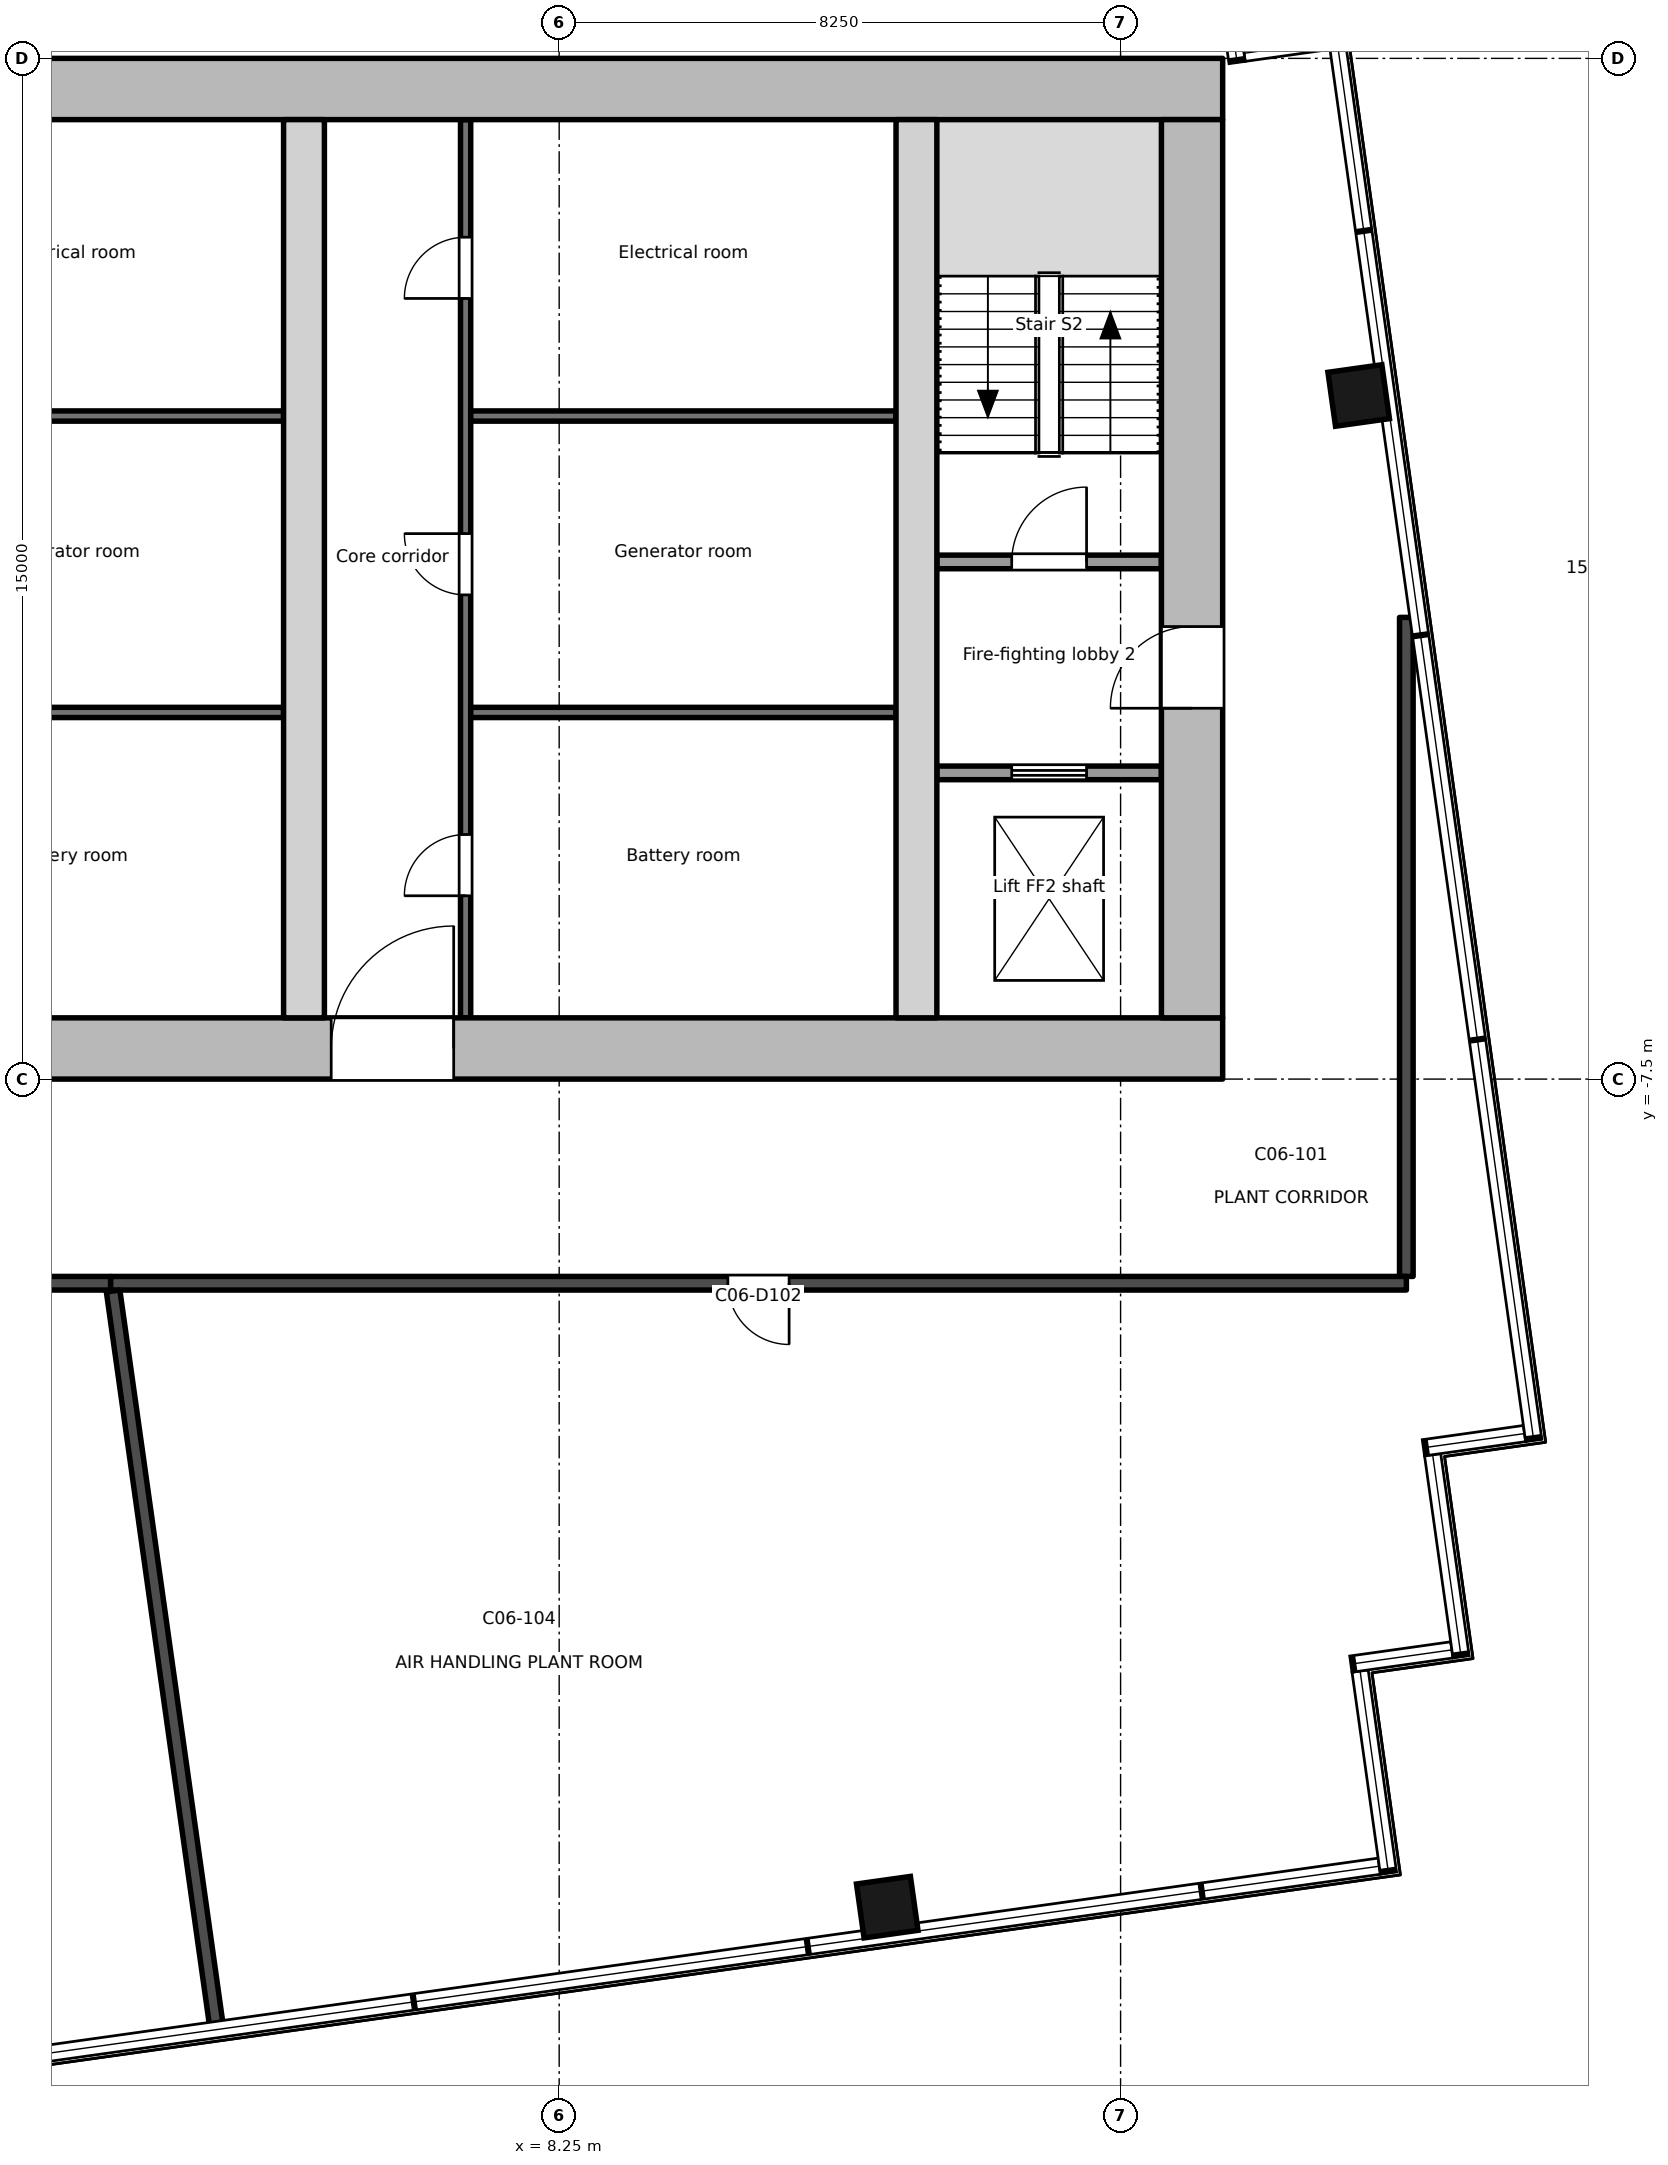
"""IFC4 building model, lengths in metres.
Left out: names, types, materials, properties, quantities, classifications, styles, units other than length and angle.
Written with IfcOpenShell. Run it as: python <this file> out.ifc"""

import sys

from ifc_helpers import new_model, si_unit, direction, frame, frame_2d, origin, origin_2d, place, context, subcontext, project, spatial, rectangle, extrude, element, fill, save


model = new_model("IFC4")
c1 = context("Model", 3, precision=1e-05, world=origin(), true_north=direction((0.0, 1.0)))
c2 = subcontext(c1, "Body", "Model", "MODEL_VIEW")
j1 = project(units=[si_unit("LENGTHUNIT", "METRE"), si_unit("PLANEANGLEUNIT", "RADIAN")], contexts=[c1])
p1 = place(None, origin())
s1 = spatial("IfcSite", under=j1, at=p1, CompositionType="ELEMENT")
p2 = place(p1, origin())
s2 = spatial("IfcBuilding", under=s1, at=p2, CompositionType="ELEMENT")
p3 = place(p2, frame((0.0, 0.0, 312.3)))
s3 = spatial("IfcBuildingStorey", under=s2, at=p3, CompositionType="ELEMENT", Elevation=312.3)
for number, where, z_axis, x_axis in (
    (1, (13.071, -19.669, -0.2), (0.0, 0.0, 1.0), (0.99, 0.139, 0.0)),
    (2, (19.999, 2.546, -0.2), (0.0, 0.0, 1.0), (-0.139, 0.99, 0.0)),
):
    element("IfcColumn", number, at=place(p3, frame(where, z_axis=z_axis, x_axis=x_axis)), inside=s3, PredefinedType="COLUMN", context=c2, shape_type="SweptSolid", body=[
        extrude(rectangle(XDim=0.8, YDim=0.8, at=origin_2d()), origin(), (0.0, 0.0, 1.0), 3.95),
    ])
p4 = place(p3, frame((-18.0, -7.05, -0.2), z_axis=(0.0, 0.0, 1.0), x_axis=(1.0, 0.0, 0.0)))
e3 = element("IfcWall", 3, at=p4, inside=s3, PredefinedType="SHEAR", context=c2, shape_type="SweptSolid", body=[
    extrude(rectangle(XDim=36.0, YDim=0.9, at=frame_2d((18.0, 0.0))), origin(), (0.0, 0.0, 1.0), 3.95),
])
p5 = place(p4, frame((4.9, 0.0, 0.2)))
e4 = element("IfcOpeningElement", 4, at=p5, cuts=e3, PredefinedType="OPENING", context=c2, shape_type="SweptSolid", body=[
    extrude(rectangle(XDim=1.8, YDim=2.1, at=frame_2d((0.9, 1.05))), frame((0.0, 0.46, 0.0), z_axis=(0.0, -1.0, 0.0), x_axis=(1.0, 0.0, 0.0)), (0.0, 0.0, 1.0), 0.921),
])
p6 = place(p4, frame((13.9, 0.0, 0.2)))
e5 = element("IfcOpeningElement", 5, at=p6, cuts=e3, PredefinedType="OPENING", context=c2, shape_type="SweptSolid", body=[
    extrude(rectangle(XDim=1.8, YDim=2.1, at=frame_2d((0.9, 1.05))), frame((0.0, 0.46, 0.0), z_axis=(0.0, -1.0, 0.0), x_axis=(1.0, 0.0, 0.0)), (0.0, 0.0, 1.0), 0.921),
])
p7 = place(p4, frame((22.9, 0.0, 0.2)))
e6 = element("IfcOpeningElement", 6, at=p7, cuts=e3, PredefinedType="OPENING", context=c2, shape_type="SweptSolid", body=[
    extrude(rectangle(XDim=1.8, YDim=2.1, at=frame_2d((0.9, 1.05))), frame((0.0, 0.46, 0.0), z_axis=(0.0, -1.0, 0.0), x_axis=(1.0, 0.0, 0.0)), (0.0, 0.0, 1.0), 0.921),
])
p8 = place(p3, frame((-18.0, 7.05, -0.2), z_axis=(0.0, 0.0, 1.0), x_axis=(1.0, 0.0, 0.0)))
e7 = element("IfcWall", 7, at=p8, inside=s3, PredefinedType="SHEAR", context=c2, shape_type="SweptSolid", body=[
    extrude(rectangle(XDim=36.0, YDim=0.9, at=frame_2d((18.0, 0.0))), origin(), (0.0, 0.0, 1.0), 3.95),
])
p9 = place(p3, frame((17.55, -6.6, -0.2), z_axis=(0.0, 0.0, 1.0), x_axis=(0.0, 1.0, 0.0)))
e8 = element("IfcWall", 8, at=p9, inside=s3, PredefinedType="SHEAR", context=c2, shape_type="SweptSolid", body=[
    extrude(rectangle(XDim=13.2, YDim=0.9, at=frame_2d((6.6, 0.0))), origin(), (0.0, 0.0, 1.0), 3.95),
])
p10 = place(p9, frame((4.55, 0.0, 0.2)))
e9 = element("IfcOpeningElement", 9, at=p10, cuts=e8, PredefinedType="OPENING", context=c2, shape_type="SweptSolid", body=[
    extrude(rectangle(XDim=1.2, YDim=2.1, at=frame_2d((0.6, 1.05))), frame((0.0, 0.46, 0.0), z_axis=(0.0, -1.0, 0.0), x_axis=(1.0, 0.0, 0.0)), (0.0, 0.0, 1.0), 0.921),
])
for number, where, z_axis, x_axis in (
    (10, (4.5, -6.6, -0.2), (0.0, 0.0, 1.0), (0.0, 1.0, 0.0)),
    (11, (13.5, -6.6, -0.2), (0.0, 0.0, 1.0), (0.0, 1.0, 0.0)),
):
    element("IfcWall", number, at=place(p3, frame(where, z_axis=z_axis, x_axis=x_axis)), inside=s3, PredefinedType="SHEAR", context=c2, shape_type="SweptSolid", body=[
        extrude(rectangle(XDim=13.2, YDim=0.6, at=frame_2d((6.6, 0.0))), origin(), (0.0, 0.0, 1.0), 3.95),
    ])
p11 = place(p3, frame((13.8, -3.0, 0.0), z_axis=(0.0, 0.0, 1.0), x_axis=(1.0, 0.0, 0.0)))
e12 = element("IfcWall", 12, at=p11, inside=s3, PredefinedType="PARTITIONING", context=c2, shape_type="SweptSolid", body=[
    extrude(rectangle(XDim=3.3, YDim=0.2, at=frame_2d((1.65, 0.0))), origin(), (0.0, 0.0, 1.0), 3.75),
])
p12 = place(p11, frame((1.1, 0.0, 0.0)))
e13 = element("IfcOpeningElement", 13, at=p12, cuts=e12, PredefinedType="OPENING", context=c2, shape_type="SweptSolid", body=[
    extrude(rectangle(XDim=1.1, YDim=2.1, at=frame_2d((0.55, 1.05))), frame((0.0, 0.111, 0.0), z_axis=(0.0, -1.0, 0.0), x_axis=(1.0, 0.0, 0.0)), (0.0, 0.0, 1.0), 0.221),
])
p13 = place(p3, frame((13.8, 0.1, 0.0), z_axis=(0.0, 0.0, 1.0), x_axis=(1.0, 0.0, 0.0)))
e14 = element("IfcWall", 14, at=p13, inside=s3, PredefinedType="PARTITIONING", context=c2, shape_type="SweptSolid", body=[
    extrude(rectangle(XDim=3.3, YDim=0.2, at=frame_2d((1.65, 0.0))), origin(), (0.0, 0.0, 1.0), 3.75),
])
p14 = place(p13, frame((1.1, 0.0, 0.0)))
e15 = element("IfcOpeningElement", 15, at=p14, cuts=e14, PredefinedType="OPENING", context=c2, shape_type="SweptSolid", body=[
    extrude(rectangle(XDim=1.1, YDim=2.1, at=frame_2d((0.55, 1.05))), frame((0.0, 0.111, 0.0), z_axis=(0.0, -1.0, 0.0), x_axis=(1.0, 0.0, 0.0)), (0.0, 0.0, 1.0), 0.221),
])
for number, where, z_axis, x_axis in (
    (16, (-2.05, -2.112, 0.0), (0.0, 0.0, 1.0), (1.0, 0.0, 0.0)),
    (17, (-2.05, 2.244, 0.0), (0.0, 0.0, 1.0), (1.0, 0.0, 0.0)),
):
    element("IfcWall", number, at=place(p3, frame(where, z_axis=z_axis, x_axis=x_axis)), inside=s3, PredefinedType="PARTITIONING", context=c2, shape_type="SweptSolid", body=[
        extrude(rectangle(XDim=6.25, YDim=0.15, at=frame_2d((3.125, 0.0))), origin(), (0.0, 0.0, 1.0), 3.75),
    ])
p15 = place(p3, frame((6.875, -6.6, 0.0), z_axis=(0.0, 0.0, 1.0), x_axis=(0.0, 1.0, 0.0)))
e18 = element("IfcWall", 18, at=p15, inside=s3, PredefinedType="PARTITIONING", context=c2, shape_type="SweptSolid", body=[
    extrude(rectangle(XDim=13.2, YDim=0.15, at=frame_2d((6.6, 0.0))), origin(), (0.0, 0.0, 1.0), 3.75),
])
p16 = place(p15, frame((1.794, 0.0, 0.0)))
e19 = element("IfcOpeningElement", 19, at=p16, cuts=e18, PredefinedType="OPENING", context=c2, shape_type="SweptSolid", body=[
    extrude(rectangle(XDim=0.9, YDim=2.1, at=frame_2d((0.45, 1.05))), frame((0.0, 0.085, 0.0), z_axis=(0.0, -1.0, 0.0), x_axis=(1.0, 0.0, 0.0)), (0.0, 0.0, 1.0), 0.171),
])
p17 = place(p15, frame((6.216, 0.0, 0.0)))
e20 = element("IfcOpeningElement", 20, at=p17, cuts=e18, PredefinedType="OPENING", context=c2, shape_type="SweptSolid", body=[
    extrude(rectangle(XDim=0.9, YDim=2.1, at=frame_2d((0.45, 1.05))), frame((0.0, 0.085, 0.0), z_axis=(0.0, -1.0, 0.0), x_axis=(1.0, 0.0, 0.0)), (0.0, 0.0, 1.0), 0.171),
])
p18 = place(p15, frame((10.572, 0.0, 0.0)))
e21 = element("IfcOpeningElement", 21, at=p18, cuts=e18, PredefinedType="OPENING", context=c2, shape_type="SweptSolid", body=[
    extrude(rectangle(XDim=0.9, YDim=2.1, at=frame_2d((0.45, 1.05))), frame((0.0, 0.085, 0.0), z_axis=(0.0, -1.0, 0.0), x_axis=(1.0, 0.0, 0.0)), (0.0, 0.0, 1.0), 0.171),
])
for number, where, z_axis, x_axis in (
    (22, (6.95, -2.112, 0.0), (0.0, 0.0, 1.0), (1.0, 0.0, 0.0)),
    (23, (6.95, 2.244, 0.0), (0.0, 0.0, 1.0), (1.0, 0.0, 0.0)),
):
    element("IfcWall", number, at=place(p3, frame(where, z_axis=z_axis, x_axis=x_axis)), inside=s3, PredefinedType="PARTITIONING", context=c2, shape_type="SweptSolid", body=[
        extrude(rectangle(XDim=6.25, YDim=0.15, at=frame_2d((3.125, 0.0))), origin(), (0.0, 0.0, 1.0), 3.75),
    ])
p19 = place(p3, frame((1.659, -10.5, 0.0), z_axis=(0.0, 0.0, 1.0), x_axis=(-1.0, 0.0, 0.0)))
e24 = element("IfcWall", 24, at=p19, inside=s3, PredefinedType="PARTITIONING", context=c2, shape_type="SweptSolid", body=[
    extrude(rectangle(XDim=11.673, YDim=0.2, at=frame_2d((5.836, 0.0))), origin(), (0.0, 0.0, 1.0), 3.05),
])
p20 = place(p19, frame((5.386, 0.0, 0.0)))
e25 = element("IfcOpeningElement", 25, at=p20, cuts=e24, PredefinedType="OPENING", context=c2, shape_type="SweptSolid", body=[
    extrude(rectangle(XDim=0.9, YDim=2.1, at=frame_2d((0.45, 1.05))), frame((0.0, 0.111, 0.0), z_axis=(0.0, -1.0, 0.0), x_axis=(1.0, 0.0, 0.0)), (0.0, 0.0, 1.0), 0.221),
])
p21 = place(p3, frame((20.699, -0.715, 0.0), z_axis=(0.0, 0.0, 1.0), x_axis=(0.0, -1.0, 0.0)))
e26 = element("IfcWall", 26, at=p21, inside=s3, PredefinedType="PARTITIONING", context=c2, shape_type="SweptSolid", body=[
    extrude(rectangle(XDim=9.685, YDim=0.2, at=frame_2d((4.842, 0.0))), origin(), (0.0, 0.0, 1.0), 3.75),
])
p22 = place(p3, frame((20.7, -10.5, 0.0), z_axis=(0.0, 0.0, 1.0), x_axis=(-1.0, 0.0, 0.0)))
e27 = element("IfcWall", 27, at=p22, inside=s3, PredefinedType="PARTITIONING", context=c2, shape_type="SweptSolid", body=[
    extrude(rectangle(XDim=19.041, YDim=0.2, at=frame_2d((9.521, 0.0))), origin(), (0.0, 0.0, 1.0), 3.14),
])
p23 = place(p22, frame((9.071, 0.0, 0.0)))
e28 = element("IfcOpeningElement", 28, at=p23, cuts=e27, PredefinedType="OPENING", context=c2, shape_type="SweptSolid", body=[
    extrude(rectangle(XDim=0.9, YDim=2.1, at=frame_2d((0.45, 1.05))), frame((0.0, 0.111, 0.0), z_axis=(0.0, -1.0, 0.0), x_axis=(1.0, 0.0, 0.0)), (0.0, 0.0, 1.0), 0.221),
])
p24 = place(p3, frame((1.695, -10.614, 0.0), z_axis=(0.0, 0.0, 1.0), x_axis=(0.139200796165, -0.990264176039, 0.0)))
e29 = element("IfcWall", 29, at=p24, inside=s3, PredefinedType="PARTITIONING", context=c2, shape_type="SweptSolid", body=[
    extrude(rectangle(XDim=10.869, YDim=0.2, at=frame_2d((5.434, 0.0))), origin(), (0.0, 0.0, 1.0), 3.75),
])
p25 = place(p12, origin())
e30 = element("IfcDoor", 30, at=p25, inside=s3, OperationType="DOUBLE_DOOR_SLIDING", PredefinedType="DOOR", context=c2, shape_type="SweptSolid", body=[
    extrude(rectangle(XDim=1.1, YDim=2.1, at=frame_2d((0.55, 1.05))), frame((0.0, 0.025, 0.0), z_axis=(0.0, -1.0, 0.0), x_axis=(1.0, 0.0, 0.0)), (0.0, 0.0, 1.0), 0.05),
])
fill(e13, e30)
p26 = place(p10, origin())
e31 = element("IfcDoor", 31, at=p26, inside=s3, OperationType="SINGLE_SWING_LEFT", PredefinedType="DOOR", context=c2, shape_type="SweptSolid", body=[
    extrude(rectangle(XDim=1.2, YDim=2.1, at=frame_2d((0.6, 1.05))), frame((0.0, 0.025, 0.0), z_axis=(0.0, -1.0, 0.0), x_axis=(1.0, 0.0, 0.0)), (0.0, 0.0, 1.0), 0.05),
])
fill(e9, e31)
p27 = place(p14, origin())
e32 = element("IfcDoor", 32, at=p27, inside=s3, OperationType="SINGLE_SWING_RIGHT", PredefinedType="DOOR", context=c2, shape_type="SweptSolid", body=[
    extrude(rectangle(XDim=1.1, YDim=2.1, at=frame_2d((0.55, 1.05))), frame((0.0, 0.025, 0.0), z_axis=(0.0, -1.0, 0.0), x_axis=(1.0, 0.0, 0.0)), (0.0, 0.0, 1.0), 0.05),
])
fill(e15, e32)
p28 = place(p16, origin())
e33 = element("IfcDoor", 33, at=p28, inside=s3, OperationType="SINGLE_SWING_LEFT", PredefinedType="DOOR", context=c2, shape_type="SweptSolid", body=[
    extrude(rectangle(XDim=0.9, YDim=2.1, at=frame_2d((0.45, 1.05))), frame((0.0, 0.025, 0.0), z_axis=(0.0, -1.0, 0.0), x_axis=(1.0, 0.0, 0.0)), (0.0, 0.0, 1.0), 0.05),
])
fill(e19, e33)
p29 = place(p17, origin())
e34 = element("IfcDoor", 34, at=p29, inside=s3, OperationType="SINGLE_SWING_RIGHT", PredefinedType="DOOR", context=c2, shape_type="SweptSolid", body=[
    extrude(rectangle(XDim=0.9, YDim=2.1, at=frame_2d((0.45, 1.05))), frame((0.0, 0.025, 0.0), z_axis=(0.0, -1.0, 0.0), x_axis=(1.0, 0.0, 0.0)), (0.0, 0.0, 1.0), 0.05),
])
fill(e20, e34)
p30 = place(p18, origin())
e35 = element("IfcDoor", 35, at=p30, inside=s3, OperationType="SINGLE_SWING_LEFT", PredefinedType="DOOR", context=c2, shape_type="SweptSolid", body=[
    extrude(rectangle(XDim=0.9, YDim=2.1, at=frame_2d((0.45, 1.05))), frame((0.0, 0.025, 0.0), z_axis=(0.0, -1.0, 0.0), x_axis=(1.0, 0.0, 0.0)), (0.0, 0.0, 1.0), 0.05),
])
fill(e21, e35)
p31 = place(p7, origin())
e36 = element("IfcDoor", 36, at=p31, inside=s3, OperationType="SINGLE_SWING_RIGHT", PredefinedType="DOOR", context=c2, shape_type="SweptSolid", body=[
    extrude(rectangle(XDim=1.8, YDim=2.1, at=frame_2d((0.9, 1.05))), frame((0.0, 0.025, 0.0), z_axis=(0.0, -1.0, 0.0), x_axis=(1.0, 0.0, 0.0)), (0.0, 0.0, 1.0), 0.05),
])
fill(e6, e36)
p32 = place(p23, origin())
e37 = element("IfcDoor", 37, at=p32, inside=s3, OperationType="SINGLE_SWING_LEFT", PredefinedType="DOOR", context=c2, shape_type="SweptSolid", body=[
    extrude(rectangle(XDim=0.9, YDim=2.1, at=frame_2d((0.45, 1.05))), frame((0.0, 0.025, 0.0), z_axis=(0.0, -1.0, 0.0), x_axis=(1.0, 0.0, 0.0)), (0.0, 0.0, 1.0), 0.05),
])
fill(e28, e37)
save(model, sys.argv[1])
